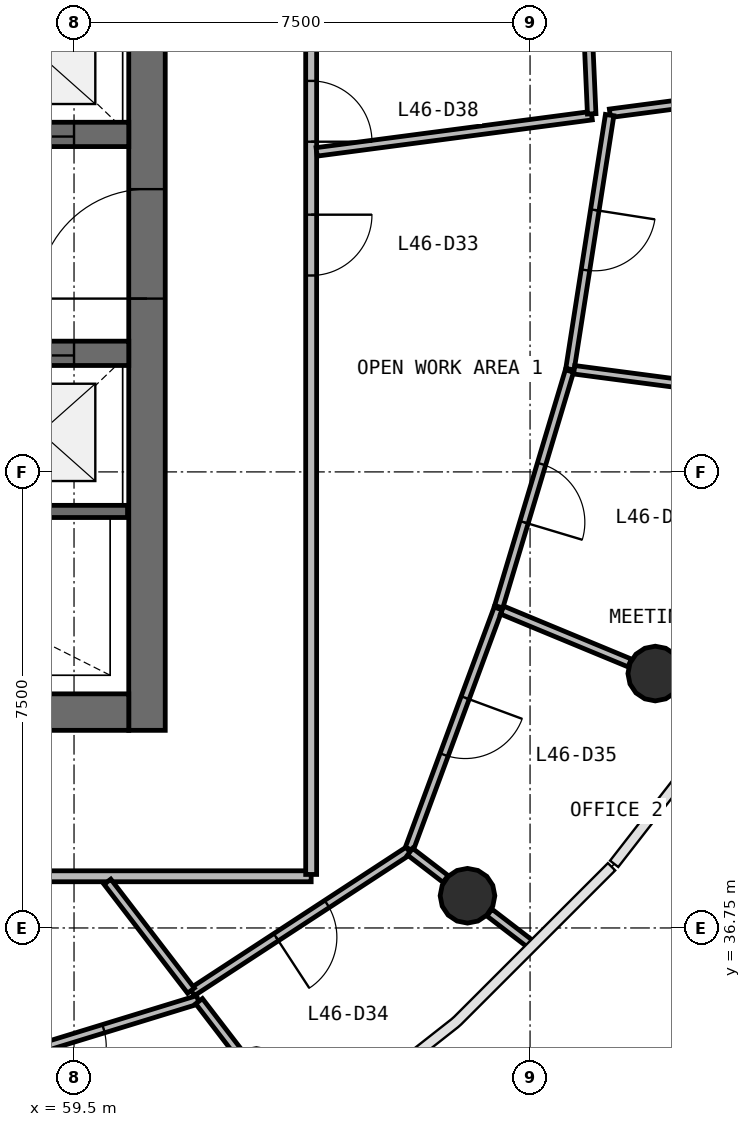
"""IFC4 building model, lengths in metres.
Left out: names, types, materials, properties, quantities, classifications, styles, units other than length and angle.
Written with IfcOpenShell. Run it as: python <this file> out.ifc"""

import sys

from ifc_helpers import new_model, si_unit, direction, frame, frame_2d, origin, origin_2d, place, context, subcontext, project, spatial, rectangle, circle, extrude, source, transform, mapped, element, fill, save


model = new_model("IFC4")
c1 = context("Model", 3, precision=1e-05, world=origin(), true_north=direction((0.0, 1.0)))
c2 = subcontext(c1, "Body", "Model", "MODEL_VIEW")
j1 = project(units=[si_unit("LENGTHUNIT", "METRE"), si_unit("PLANEANGLEUNIT", "RADIAN")], contexts=[c1])
p1 = place(None, origin())
s1 = spatial("IfcSite", under=j1, at=p1, CompositionType="ELEMENT")
p2 = place(p1, origin())
s2 = spatial("IfcBuilding", under=s1, at=p2, CompositionType="ELEMENT")
p3 = place(p2, frame((0.0, 0.0, 191.6)))
s3 = spatial("IfcBuildingStorey", under=s2, at=p3, CompositionType="ELEMENT", Elevation=191.6)
p4 = place(p3, frame((60.7, 40.0, 0.0), z_axis=(0.0, 0.0, 1.0), x_axis=(0.0, 1.0, 0.0)))
e1 = element("IfcWall", 1, at=p4, inside=s3, PredefinedType="SHEAR", context=c2, shape_type="SweptSolid", body=[
    extrude(rectangle(XDim=16.0, YDim=0.6, at=frame_2d((8.0, 0.0))), origin(), (0.0, 0.0, 1.0), 3.9),
])
p5 = place(p4, frame((7.1, 0.0, 0.0)))
e2 = element("IfcOpeningElement", 2, at=p5, cuts=e1, PredefinedType="OPENING", context=c2, shape_type="SweptSolid", body=[
    extrude(rectangle(XDim=1.8, YDim=2.1, at=frame_2d((0.9, 1.05))), frame((0.0, 0.31, 0.0), z_axis=(0.0, -1.0, 0.0), x_axis=(1.0, 0.0, 0.0)), (0.0, 0.0, 1.0), 0.62),
])
p6 = place(p3, frame((43.6, 40.3, 0.0), z_axis=(0.0, 0.0, 1.0), x_axis=(1.0, 0.0, 0.0)))
e3 = element("IfcWall", 3, at=p6, inside=s3, PredefinedType="SHEAR", context=c2, shape_type="SweptSolid", body=[
    extrude(rectangle(XDim=16.8, YDim=0.6, at=frame_2d((8.4, 0.0))), origin(), (0.0, 0.0, 1.0), 3.9),
])
p7 = place(p6, frame((10.3, 0.0, 0.0)))
e4 = element("IfcOpeningElement", 4, at=p7, cuts=e3, PredefinedType="OPENING", context=c2, shape_type="SweptSolid", body=[
    extrude(rectangle(XDim=1.2, YDim=2.1, at=frame_2d((0.6, 1.05))), frame((0.0, 0.31, 0.0), z_axis=(0.0, -1.0, 0.0), x_axis=(1.0, 0.0, 0.0)), (0.0, 0.0, 1.0), 0.62),
])
p8 = place(p6, frame((7.25, 0.0, 0.0)))
e5 = element("IfcOpeningElement", 5, at=p8, cuts=e3, PredefinedType="OPENING", context=c2, shape_type="SweptSolid", body=[
    extrude(rectangle(XDim=1.1, YDim=2.1, at=frame_2d((0.55, 1.05))), frame((0.0, 0.31, 0.0), z_axis=(0.0, -1.0, 0.0), x_axis=(1.0, 0.0, 0.0)), (0.0, 0.0, 1.0), 0.62),
])
p9 = place(p6, frame((0.7, 0.0, 0.0)))
e6 = element("IfcOpeningElement", 6, at=p9, cuts=e3, PredefinedType="OPENING", context=c2, shape_type="SweptSolid", body=[
    extrude(rectangle(XDim=0.8, YDim=2.1, at=frame_2d((0.4, 1.05))), frame((0.0, 0.31, 0.0), z_axis=(0.0, -1.0, 0.0), x_axis=(1.0, 0.0, 0.0)), (0.0, 0.0, 1.0), 0.62),
])
p10 = place(p3, frame((43.6, 49.8, 0.0), z_axis=(0.0, 0.0, 1.0), x_axis=(1.0, 0.0, 0.0)))
e7 = element("IfcWall", 7, at=p10, inside=s3, PredefinedType="SHEAR", context=c2, shape_type="SweptSolid", body=[
    extrude(rectangle(XDim=16.8, YDim=0.4, at=frame_2d((8.4, 0.0))), origin(), (0.0, 0.0, 1.0), 3.9),
])
p11 = place(p10, frame((9.8, 0.0, 0.0)))
e8 = element("IfcOpeningElement", 8, at=p11, cuts=e7, PredefinedType="OPENING", context=c2, shape_type="SweptSolid", body=[
    extrude(rectangle(XDim=1.1, YDim=2.1, at=frame_2d((0.55, 1.05))), frame((0.0, 0.21, 0.0), z_axis=(0.0, -1.0, 0.0), x_axis=(1.0, 0.0, 0.0)), (0.0, 0.0, 1.0), 0.42),
])
p12 = place(p10, frame((12.3, 0.0, 0.0)))
e9 = element("IfcOpeningElement", 9, at=p12, cuts=e7, PredefinedType="OPENING", context=c2, shape_type="SweptSolid", body=[
    extrude(rectangle(XDim=1.1, YDim=2.1, at=frame_2d((0.55, 1.05))), frame((0.0, 0.21, 0.0), z_axis=(0.0, -1.0, 0.0), x_axis=(1.0, 0.0, 0.0)), (0.0, 0.0, 1.0), 0.42),
])
p13 = place(p10, frame((14.8, 0.0, 0.0)))
e10 = element("IfcOpeningElement", 10, at=p13, cuts=e7, PredefinedType="OPENING", context=c2, shape_type="SweptSolid", body=[
    extrude(rectangle(XDim=1.1, YDim=2.1, at=frame_2d((0.55, 1.05))), frame((0.0, 0.21, 0.0), z_axis=(0.0, -1.0, 0.0), x_axis=(1.0, 0.0, 0.0)), (0.0, 0.0, 1.0), 0.42),
])
p14 = place(p10, frame((2.05, 0.0, 0.0)))
e11 = element("IfcOpeningElement", 11, at=p14, cuts=e7, PredefinedType="OPENING", context=c2, shape_type="SweptSolid", body=[
    extrude(rectangle(XDim=0.9, YDim=2.1, at=frame_2d((0.45, 1.05))), frame((0.0, 0.21, 0.0), z_axis=(0.0, -1.0, 0.0), x_axis=(1.0, 0.0, 0.0)), (0.0, 0.0, 1.0), 0.42),
])
p15 = place(p10, frame((5.25, 0.0, 0.0)))
e12 = element("IfcOpeningElement", 12, at=p15, cuts=e7, PredefinedType="OPENING", context=c2, shape_type="SweptSolid", body=[
    extrude(rectangle(XDim=0.9, YDim=2.1, at=frame_2d((0.45, 1.05))), frame((0.0, 0.21, 0.0), z_axis=(0.0, -1.0, 0.0), x_axis=(1.0, 0.0, 0.0)), (0.0, 0.0, 1.0), 0.42),
])
p16 = place(p10, frame((7.85, 0.0, 0.0)))
e13 = element("IfcOpeningElement", 13, at=p16, cuts=e7, PredefinedType="OPENING", context=c2, shape_type="SweptSolid", body=[
    extrude(rectangle(XDim=0.9, YDim=2.1, at=frame_2d((0.45, 1.05))), frame((0.0, 0.21, 0.0), z_axis=(0.0, -1.0, 0.0), x_axis=(1.0, 0.0, 0.0)), (0.0, 0.0, 1.0), 0.42),
])
p17 = place(p3, frame((43.6, 46.2, 0.0), z_axis=(0.0, 0.0, 1.0), x_axis=(1.0, 0.0, 0.0)))
e14 = element("IfcWall", 14, at=p17, inside=s3, PredefinedType="SHEAR", context=c2, shape_type="SweptSolid", body=[
    extrude(rectangle(XDim=16.8, YDim=0.4, at=frame_2d((8.4, 0.0))), origin(), (0.0, 0.0, 1.0), 3.9),
])
p18 = place(p17, frame((9.8, 0.0, 0.0)))
e15 = element("IfcOpeningElement", 15, at=p18, cuts=e14, PredefinedType="OPENING", context=c2, shape_type="SweptSolid", body=[
    extrude(rectangle(XDim=1.1, YDim=2.1, at=frame_2d((0.55, 1.05))), frame((0.0, 0.21, 0.0), z_axis=(0.0, -1.0, 0.0), x_axis=(1.0, 0.0, 0.0)), (0.0, 0.0, 1.0), 0.42),
])
p19 = place(p17, frame((12.3, 0.0, 0.0)))
e16 = element("IfcOpeningElement", 16, at=p19, cuts=e14, PredefinedType="OPENING", context=c2, shape_type="SweptSolid", body=[
    extrude(rectangle(XDim=1.1, YDim=2.1, at=frame_2d((0.55, 1.05))), frame((0.0, 0.21, 0.0), z_axis=(0.0, -1.0, 0.0), x_axis=(1.0, 0.0, 0.0)), (0.0, 0.0, 1.0), 0.42),
])
p20 = place(p17, frame((14.8, 0.0, 0.0)))
e17 = element("IfcOpeningElement", 17, at=p20, cuts=e14, PredefinedType="OPENING", context=c2, shape_type="SweptSolid", body=[
    extrude(rectangle(XDim=1.1, YDim=2.1, at=frame_2d((0.55, 1.05))), frame((0.0, 0.21, 0.0), z_axis=(0.0, -1.0, 0.0), x_axis=(1.0, 0.0, 0.0)), (0.0, 0.0, 1.0), 0.42),
])
p21 = place(p17, frame((3.45, 0.0, 0.0)))
e18 = element("IfcOpeningElement", 18, at=p21, cuts=e14, PredefinedType="OPENING", context=c2, shape_type="SweptSolid", body=[
    extrude(rectangle(XDim=0.9, YDim=2.1, at=frame_2d((0.45, 1.05))), frame((0.0, 0.21, 0.0), z_axis=(0.0, -1.0, 0.0), x_axis=(1.0, 0.0, 0.0)), (0.0, 0.0, 1.0), 0.42),
])
p22 = place(p17, frame((7.85, 0.0, 0.0)))
e19 = element("IfcOpeningElement", 19, at=p22, cuts=e14, PredefinedType="OPENING", context=c2, shape_type="SweptSolid", body=[
    extrude(rectangle(XDim=0.9, YDim=2.1, at=frame_2d((0.45, 1.05))), frame((0.0, 0.21, 0.0), z_axis=(0.0, -1.0, 0.0), x_axis=(1.0, 0.0, 0.0)), (0.0, 0.0, 1.0), 0.42),
])
m1 = source(origin(), c2, "Body", "SweptSolid", [
    extrude(circle(Radius=0.45, at=origin_2d()), origin(), (0.0, 0.0, 1.0), 3.9),
])
for number, where, z_axis, x_axis in (
    (20, (65.971, 37.28, 0.0), (0.0, 0.0, 1.0), (1.0, 0.0, 0.0)),
    (21, (69.059, 40.934, 0.0), (0.0, 0.0, 1.0), (1.0, 0.0, 0.0)),
):
    element("IfcColumn", number, at=place(p3, frame(where, z_axis=z_axis, x_axis=x_axis)), inside=s3, PredefinedType="COLUMN", context=c2, shape_type="MappedRepresentation", body=[
        mapped(m1, transform((0.0, 0.0, 0.0), scale=1.0)),
    ])
p23 = place(p3, frame((57.7, 43.6, 0.0), z_axis=(0.0, 0.0, 1.0), x_axis=(1.0, 0.0, 0.0)))
e22 = element("IfcWall", 22, at=p23, inside=s3, PredefinedType="SOLIDWALL", context=c2, shape_type="SweptSolid", body=[
    extrude(rectangle(XDim=2.68, YDim=0.2, at=frame_2d((1.34, 0.0))), origin(), (0.0, 0.0, 1.0), 3.58),
])
p24 = place(p3, frame((63.4, 37.6, 0.0), z_axis=(0.0, 0.0, 1.0), x_axis=(-1.0, 0.0, 0.0)))
e23 = element("IfcWall", 23, at=p24, inside=s3, PredefinedType="PARTITIONING", context=c2, shape_type="SweptSolid", body=[
    extrude(rectangle(XDim=22.8, YDim=0.18, at=frame_2d((11.4, 0.0))), origin(), (0.0, 0.0, 1.0), 2.88),
])
p25 = place(p24, frame((10.95, 0.0, 0.0)))
e24 = element("IfcOpeningElement", 24, at=p25, cuts=e23, PredefinedType="OPENING", context=c2, shape_type="SweptSolid", body=[
    extrude(rectangle(XDim=1.0, YDim=2.1, at=frame_2d((0.5, 1.05))), frame((0.0, 0.1, 0.0), z_axis=(0.0, -1.0, 0.0), x_axis=(1.0, 0.0, 0.0)), (0.0, 0.0, 1.0), 0.2),
])
p26 = place(p24, frame((8.75, 0.0, 0.0)))
e25 = element("IfcOpeningElement", 25, at=p26, cuts=e23, PredefinedType="OPENING", context=c2, shape_type="SweptSolid", body=[
    extrude(rectangle(XDim=1.0, YDim=2.1, at=frame_2d((0.5, 1.05))), frame((0.0, 0.1, 0.0), z_axis=(0.0, -1.0, 0.0), x_axis=(1.0, 0.0, 0.0)), (0.0, 0.0, 1.0), 0.2),
])
p27 = place(p3, frame((63.4, 58.37, 0.0), z_axis=(0.0, 0.0, 1.0), x_axis=(0.0, -1.0, 0.0)))
e26 = element("IfcWall", 26, at=p27, inside=s3, PredefinedType="PARTITIONING", context=c2, shape_type="SweptSolid", body=[
    extrude(rectangle(XDim=20.74, YDim=0.18, at=frame_2d((10.37, 0.0))), origin(), (0.0, 0.0, 1.0), 2.88),
])
p28 = place(p27, frame((9.89, 0.0, 0.0)))
e27 = element("IfcOpeningElement", 27, at=p28, cuts=e26, PredefinedType="OPENING", context=c2, shape_type="SweptSolid", body=[
    extrude(rectangle(XDim=1.0, YDim=2.1, at=frame_2d((0.5, 1.05))), frame((0.0, 0.1, 0.0), z_axis=(0.0, -1.0, 0.0), x_axis=(1.0, 0.0, 0.0)), (0.0, 0.0, 1.0), 0.2),
])
p29 = place(p27, frame((7.69, 0.0, 0.0)))
e28 = element("IfcOpeningElement", 28, at=p29, cuts=e26, PredefinedType="OPENING", context=c2, shape_type="SweptSolid", body=[
    extrude(rectangle(XDim=1.0, YDim=2.1, at=frame_2d((0.5, 1.05))), frame((0.0, 0.1, 0.0), z_axis=(0.0, -1.0, 0.0), x_axis=(1.0, 0.0, 0.0)), (0.0, 0.0, 1.0), 0.2),
])
p30 = place(p3, frame((63.49, 49.513, 0.0), z_axis=(0.0, 0.0, 1.0), x_axis=(0.991445189432, 0.130523700346, 0.0)))
e29 = element("IfcWall", 29, at=p30, inside=s3, PredefinedType="PARTITIONING", context=c2, shape_type="SweptSolid", body=[
    extrude(rectangle(XDim=4.564, YDim=0.14, at=frame_2d((2.282, 0.0))), origin(), (0.0, 0.0, 1.0), 2.88),
])
p31 = place(p3, frame((67.821, 54.523, 0.0), z_axis=(0.0, 0.0, 1.0), x_axis=(0.043891066245, -0.999036322815, 0.0)))
e30 = element("IfcWall", 30, at=p31, inside=s3, PredefinedType="PARTITIONING", context=c2, shape_type="SweptSolid", body=[
    extrude(rectangle(XDim=4.389, YDim=0.14, at=frame_2d((2.194, 0.0))), origin(), (0.0, 0.0, 1.0), 2.88),
])
p32 = place(p31, frame((1.739, 0.0, 0.0)))
e31 = element("IfcOpeningElement", 31, at=p32, cuts=e30, PredefinedType="OPENING", context=c2, shape_type="SweptSolid", body=[
    extrude(rectangle(XDim=1.0, YDim=2.1, at=frame_2d((0.5, 1.05))), frame((0.0, 0.08, 0.0), z_axis=(0.0, -1.0, 0.0), x_axis=(1.0, 0.0, 0.0)), (0.0, 0.0, 1.0), 0.16),
])
p33 = place(p3, frame((68.313, 50.148, 0.0), z_axis=(0.0, 0.0, 1.0), x_axis=(0.991443942206, 0.130533173806, 0.0)))
e32 = element("IfcWall", 32, at=p33, inside=s3, PredefinedType="PARTITIONING", context=c2, shape_type="SweptSolid", body=[
    extrude(rectangle(XDim=4.335, YDim=0.14, at=frame_2d((2.168, 0.0))), origin(), (0.0, 0.0, 1.0), 2.88),
])
p34 = place(p3, frame((68.309, 50.118, 0.0), z_axis=(0.0, 0.0, 1.0), x_axis=(-0.154216660459, -0.988037054789, 0.0)))
e33 = element("IfcWall", 33, at=p34, inside=s3, PredefinedType="PARTITIONING", context=c2, shape_type="SweptSolid", body=[
    extrude(rectangle(XDim=4.23, YDim=0.14, at=frame_2d((2.115, 0.0))), origin(), (0.0, 0.0, 1.0), 2.88),
])
p35 = place(p34, frame((1.58, 0.0, 0.0)))
e34 = element("IfcOpeningElement", 34, at=p35, cuts=e33, PredefinedType="OPENING", context=c2, shape_type="SweptSolid", body=[
    extrude(rectangle(XDim=1.0, YDim=2.1, at=frame_2d((0.5, 1.05))), frame((0.0, 0.08, 0.0), z_axis=(0.0, -1.0, 0.0), x_axis=(1.0, 0.0, 0.0)), (0.0, 0.0, 1.0), 0.16),
])
p36 = place(p3, frame((65.003, 38.022, 0.0), z_axis=(0.0, 0.0, 1.0), x_axis=(-0.837161645349, -0.546955555376, 0.0)))
e35 = element("IfcWall", 35, at=p36, inside=s3, PredefinedType="PARTITIONING", context=c2, shape_type="SweptSolid", body=[
    extrude(rectangle(XDim=4.254, YDim=0.14, at=frame_2d((2.127, 0.0))), origin(), (0.0, 0.0, 1.0), 2.88),
])
p37 = place(p36, frame((1.604, 0.0, 0.0)))
e36 = element("IfcOpeningElement", 36, at=p37, cuts=e35, PredefinedType="OPENING", context=c2, shape_type="SweptSolid", body=[
    extrude(rectangle(XDim=1.0, YDim=2.1, at=frame_2d((0.5, 1.05))), frame((0.0, 0.08, 0.0), z_axis=(0.0, -1.0, 0.0), x_axis=(1.0, 0.0, 0.0)), (0.0, 0.0, 1.0), 0.16),
])
p38 = place(p3, frame((66.476, 42.004, 0.0), z_axis=(0.0, 0.0, 1.0), x_axis=(-0.346867255576, -0.937914232225, 0.0)))
e37 = element("IfcWall", 37, at=p38, inside=s3, PredefinedType="PARTITIONING", context=c2, shape_type="SweptSolid", body=[
    extrude(rectangle(XDim=4.215, YDim=0.14, at=frame_2d((2.108, 0.0))), origin(), (0.0, 0.0, 1.0), 2.88),
])
p39 = place(p38, frame((1.565, 0.0, 0.0)))
e38 = element("IfcOpeningElement", 38, at=p39, cuts=e37, PredefinedType="OPENING", context=c2, shape_type="SweptSolid", body=[
    extrude(rectangle(XDim=1.0, YDim=2.1, at=frame_2d((0.5, 1.05))), frame((0.0, 0.08, 0.0), z_axis=(0.0, -1.0, 0.0), x_axis=(1.0, 0.0, 0.0)), (0.0, 0.0, 1.0), 0.16),
])
p40 = place(p3, frame((67.648, 45.91, 0.0), z_axis=(0.0, 0.0, 1.0), x_axis=(-0.28737001705, -0.957819645497, 0.0)))
e39 = element("IfcWall", 39, at=p40, inside=s3, PredefinedType="PARTITIONING", context=c2, shape_type="SweptSolid", body=[
    extrude(rectangle(XDim=4.048, YDim=0.14, at=frame_2d((2.024, 0.0))), origin(), (0.0, 0.0, 1.0), 2.88),
])
p41 = place(p40, frame((1.598, 0.0, 0.0)))
e40 = element("IfcOpeningElement", 40, at=p41, cuts=e39, PredefinedType="OPENING", context=c2, shape_type="SweptSolid", body=[
    extrude(rectangle(XDim=1.0, YDim=2.1, at=frame_2d((0.5, 1.05))), frame((0.0, 0.08, 0.0), z_axis=(0.0, -1.0, 0.0), x_axis=(1.0, 0.0, 0.0)), (0.0, 0.0, 1.0), 0.16),
])
p42 = place(p3, frame((61.538, 35.57, 0.0), z_axis=(0.0, 0.0, 1.0), x_axis=(-0.956031356948, -0.293264461761, 0.0)))
e41 = element("IfcWall", 41, at=p42, inside=s3, PredefinedType="PARTITIONING", context=c2, shape_type="SweptSolid", body=[
    extrude(rectangle(XDim=4.073, YDim=0.14, at=frame_2d((2.037, 0.0))), origin(), (0.0, 0.0, 1.0), 2.88),
])
p43 = place(p42, frame((1.624, 0.0, 0.0)))
e42 = element("IfcOpeningElement", 42, at=p43, cuts=e41, PredefinedType="OPENING", context=c2, shape_type="SweptSolid", body=[
    extrude(rectangle(XDim=1.0, YDim=2.1, at=frame_2d((0.5, 1.05))), frame((0.0, 0.08, 0.0), z_axis=(0.0, -1.0, 0.0), x_axis=(1.0, 0.0, 0.0)), (0.0, 0.0, 1.0), 0.16),
])
p44 = place(p3, frame((67.726, 45.93, 0.0), z_axis=(0.0, 0.0, 1.0), x_axis=(0.991443886809, -0.130533594563, 0.0)))
e43 = element("IfcWall", 43, at=p44, inside=s3, PredefinedType="PARTITIONING", context=c2, shape_type="SweptSolid", body=[
    extrude(rectangle(XDim=3.434, YDim=0.14, at=frame_2d((1.717, 0.0))), origin(), (0.0, 0.0, 1.0), 2.88),
])
p45 = place(p3, frame((60.049, 37.51, 0.0), z_axis=(0.0, 0.0, 1.0), x_axis=(0.608738046736, -0.793371281593, 0.0)))
e44 = element("IfcWall", 44, at=p45, inside=s3, PredefinedType="PARTITIONING", context=c2, shape_type="SweptSolid", body=[
    extrude(rectangle(XDim=2.257, YDim=0.14, at=frame_2d((1.128, 0.0))), origin(), (0.0, 0.0, 1.0), 2.88),
])
p46 = place(p3, frame((66.541, 41.977, 0.0), z_axis=(0.0, 0.0, 1.0), x_axis=(0.923885824628, -0.382668241498, 0.0)))
e45 = element("IfcWall", 45, at=p46, inside=s3, PredefinedType="PARTITIONING", context=c2, shape_type="SweptSolid", body=[
    extrude(rectangle(XDim=2.271, YDim=0.14, at=frame_2d((1.136, 0.0))), origin(), (0.0, 0.0, 1.0), 2.88),
])
p47 = place(p3, frame((61.556, 35.546, 0.0), z_axis=(0.0, 0.0, 1.0), x_axis=(0.608740457709, -0.793369431695, 0.0)))
e46 = element("IfcWall", 46, at=p47, inside=s3, PredefinedType="PARTITIONING", context=c2, shape_type="SweptSolid", body=[
    extrude(rectangle(XDim=1.095, YDim=0.14, at=frame_2d((0.547, 0.0))), origin(), (0.0, 0.0, 1.0), 2.88),
])
p48 = place(p3, frame((66.332, 37.003, 0.0), z_axis=(0.0, 0.0, 1.0), x_axis=(0.793390985662, -0.608712365466, 0.0)))
e47 = element("IfcWall", 47, at=p48, inside=s3, PredefinedType="PARTITIONING", context=c2, shape_type="SweptSolid", body=[
    extrude(rectangle(XDim=0.839, YDim=0.14, at=frame_2d((0.42, 0.0))), origin(), (0.0, 0.0, 1.0), 2.88),
])
p49 = place(p3, frame((65.027, 38.004, 0.0), z_axis=(0.0, 0.0, 1.0), x_axis=(0.793339152382, -0.608779918606, 0.0)))
e48 = element("IfcWall", 48, at=p49, inside=s3, PredefinedType="PARTITIONING", context=c2, shape_type="SweptSolid", body=[
    extrude(rectangle(XDim=0.736, YDim=0.14, at=frame_2d((0.368, 0.0))), origin(), (0.0, 0.0, 1.0), 2.88),
])
m2 = source(origin(), c2, "Body", "SweptSolid", [
    extrude(rectangle(XDim=1.8, YDim=2.1, at=frame_2d((0.9, 1.05))), frame((0.0, 0.025, 0.0), z_axis=(0.0, -1.0, 0.0), x_axis=(1.0, 0.0, 0.0)), (0.0, 0.0, 1.0), 0.05),
])
p50 = place(p5, origin())
e49 = element("IfcDoor", 49, at=p50, inside=s3, OperationType="SINGLE_SWING_LEFT", PredefinedType="DOOR", context=c2, shape_type="MappedRepresentation", body=[
    mapped(m2, transform((0.0, 0.0, 0.0), scale=1.0)),
])
fill(e2, e49)
m3 = source(origin(), c2, "Body", "SweptSolid", [
    extrude(rectangle(XDim=1.1, YDim=2.1, at=frame_2d((0.55, 1.05))), frame((0.0, 0.025, 0.0), z_axis=(0.0, -1.0, 0.0), x_axis=(1.0, 0.0, 0.0)), (0.0, 0.0, 1.0), 0.05),
])
p51 = place(p13, origin())
e50 = element("IfcDoor", 50, at=p51, inside=s3, OperationType="DOUBLE_DOOR_SLIDING", PredefinedType="USERDEFINED", context=c2, shape_type="MappedRepresentation", body=[
    mapped(m3, transform((0.0, 0.0, 0.0), scale=1.0)),
])
fill(e10, e50)
p52 = place(p20, origin())
e51 = element("IfcDoor", 51, at=p52, inside=s3, OperationType="DOUBLE_DOOR_SLIDING", PredefinedType="USERDEFINED", context=c2, shape_type="MappedRepresentation", body=[
    mapped(m3, transform((0.0, 0.0, 0.0), scale=1.0)),
])
fill(e17, e51)
m4 = source(origin(), c2, "Body", "SweptSolid", [
    extrude(rectangle(XDim=1.0, YDim=2.1, at=frame_2d((0.5, 1.05))), frame((0.0, 0.025, 0.0), z_axis=(0.0, -1.0, 0.0), x_axis=(1.0, 0.0, 0.0)), (0.0, 0.0, 1.0), 0.05),
])
p53 = place(p43, origin())
e52 = element("IfcDoor", 52, at=p53, inside=s3, OperationType="SINGLE_SWING_RIGHT", PredefinedType="DOOR", context=c2, shape_type="MappedRepresentation", body=[
    mapped(m4, transform((0.0, 0.0, 0.0), scale=1.0)),
])
fill(e42, e52)
p54 = place(p28, origin())
e53 = element("IfcDoor", 53, at=p54, inside=s3, OperationType="SINGLE_SWING_LEFT", PredefinedType="DOOR", context=c2, shape_type="MappedRepresentation", body=[
    mapped(m4, transform((0.0, 0.0, 0.0), scale=1.0)),
])
fill(e27, e53)
p55 = place(p37, origin())
e54 = element("IfcDoor", 54, at=p55, inside=s3, OperationType="SINGLE_SWING_RIGHT", PredefinedType="DOOR", context=c2, shape_type="MappedRepresentation", body=[
    mapped(m4, transform((0.0, 0.0, 0.0), scale=1.0)),
])
fill(e36, e54)
p56 = place(p39, origin())
e55 = element("IfcDoor", 55, at=p56, inside=s3, OperationType="SINGLE_SWING_LEFT", PredefinedType="DOOR", context=c2, shape_type="MappedRepresentation", body=[
    mapped(m4, transform((0.0, 0.0, 0.0), scale=1.0)),
])
fill(e38, e55)
p57 = place(p41, origin())
e56 = element("IfcDoor", 56, at=p57, inside=s3, OperationType="SINGLE_SWING_RIGHT", PredefinedType="DOOR", context=c2, shape_type="MappedRepresentation", body=[
    mapped(m4, transform((0.0, 0.0, 0.0), scale=1.0)),
])
fill(e40, e56)
p58 = place(p35, origin())
e57 = element("IfcDoor", 57, at=p58, inside=s3, OperationType="SINGLE_SWING_LEFT", PredefinedType="DOOR", context=c2, shape_type="MappedRepresentation", body=[
    mapped(m4, transform((0.0, 0.0, 0.0), scale=1.0)),
])
fill(e34, e57)
p59 = place(p29, origin())
e58 = element("IfcDoor", 58, at=p59, inside=s3, OperationType="SINGLE_SWING_RIGHT", PredefinedType="DOOR", context=c2, shape_type="MappedRepresentation", body=[
    mapped(m4, transform((0.0, 0.0, 0.0), scale=1.0)),
])
fill(e28, e58)
save(model, sys.argv[1])
